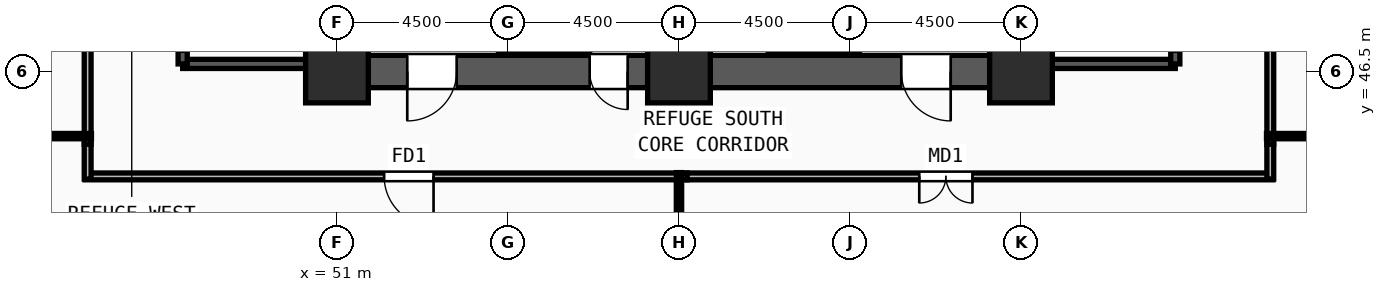
"""IFC4 building model, lengths in metres.
Left out: names, types, materials, properties, quantities, classifications, styles, units other than length and angle.
Written with IfcOpenShell. Run it as: python <this file> out.ifc"""

import sys

from ifc_helpers import new_model, si_unit, direction, frame, frame_2d, origin, origin_2d, place, context, subcontext, project, spatial, rectangle, extrude, source, transform, mapped, element, fill, save


model = new_model("IFC4")
c1 = context("Model", 3, precision=1e-05, world=origin(), true_north=direction((0.0, 1.0)))
c2 = subcontext(c1, "Body", "Model", "MODEL_VIEW")
j1 = project(units=[si_unit("LENGTHUNIT", "METRE"), si_unit("PLANEANGLEUNIT", "RADIAN")], contexts=[c1])
p1 = place(None, origin())
s1 = spatial("IfcSite", under=j1, at=p1, CompositionType="ELEMENT")
p2 = place(p1, origin())
s2 = spatial("IfcBuilding", under=s1, at=p2, CompositionType="ELEMENT")
p3 = place(p2, frame((0.0, 0.0, 93.0)))
s3 = spatial("IfcBuildingStorey", under=s2, at=p3, CompositionType="ELEMENT", Elevation=93.0)
m1 = source(origin(), c2, "Body", "SweptSolid", [
    extrude(rectangle(XDim=1.65, YDim=1.65, at=origin_2d()), origin(), (0.0, 0.0, 1.0), 4.5),
])
for number, where, z_axis, x_axis in (
    (1, (51.0, 46.5, 0.0), (0.0, 0.0, 1.0), (1.0, 0.0, 0.0)),
    (2, (60.0, 46.5, 0.0), (0.0, 0.0, 1.0), (1.0, 0.0, 0.0)),
    (3, (69.0, 46.5, 0.0), (0.0, 0.0, 1.0), (1.0, 0.0, 0.0)),
):
    element("IfcColumn", number, at=place(p3, frame(where, z_axis=z_axis, x_axis=x_axis)), inside=s3, PredefinedType="COLUMN", context=c2, shape_type="MappedRepresentation", body=[
        mapped(m1, transform((0.0, 0.0, 0.0), x_axis=(1.0, 0.0, 0.0), y_axis=(0.0, 1.0, 0.0), z_axis=(0.0, 0.0, 1.0), scale=1.0)),
    ])
p4 = place(p3, frame((68.175, 46.5, 0.0), z_axis=(0.0, 0.0, 1.0), x_axis=(-1.0, 0.0, 0.0)))
e4 = element("IfcWall", 4, at=p4, inside=s3, PredefinedType="SHEAR", context=c2, shape_type="SweptSolid", body=[
    extrude(rectangle(XDim=7.35, YDim=0.85, at=frame_2d((3.675, 0.0))), origin(), (0.0, 0.0, 1.0), 4.22),
])
m2 = source(origin(), c2, "Body", "SweptSolid", [
    extrude(rectangle(XDim=1.3, YDim=2.2, at=frame_2d((0.65, 1.1))), frame((0.0, 0.435, 0.0), z_axis=(0.0, -1.0, 0.0), x_axis=(1.0, 0.0, 0.0)), (0.0, 0.0, 1.0), 0.87),
])
p5 = place(p4, frame((1.025, 0.0, 0.0)))
e5 = element("IfcOpeningElement", 5, at=p5, cuts=e4, PredefinedType="OPENING", context=c2, shape_type="MappedRepresentation", body=[
    mapped(m2, transform((0.0, 0.0, 0.0), x_axis=(1.0, 0.0, 0.0), y_axis=(0.0, 1.0, 0.0), z_axis=(0.0, 0.0, 1.0), scale=1.0)),
])
p6 = place(p3, frame((59.175, 46.5, 0.0), z_axis=(0.0, 0.0, 1.0), x_axis=(-1.0, 0.0, 0.0)))
e6 = element("IfcWall", 6, at=p6, inside=s3, PredefinedType="SHEAR", context=c2, shape_type="SweptSolid", body=[
    extrude(rectangle(XDim=7.35, YDim=0.85, at=frame_2d((3.675, 0.0))), origin(), (0.0, 0.0, 1.0), 4.22),
])
p7 = place(p6, frame((5.025, 0.0, 0.0)))
e7 = element("IfcOpeningElement", 7, at=p7, cuts=e6, PredefinedType="OPENING", context=c2, shape_type="MappedRepresentation", body=[
    mapped(m2, transform((0.0, 0.0, 0.0), x_axis=(1.0, 0.0, 0.0), y_axis=(0.0, 1.0, 0.0), z_axis=(0.0, 0.0, 1.0), scale=1.0)),
])
m3 = source(origin(), c2, "Body", "SweptSolid", [
    extrude(rectangle(XDim=1.0, YDim=2.2, at=frame_2d((0.5, 1.1))), frame((0.0, 0.435, 0.0), z_axis=(0.0, -1.0, 0.0), x_axis=(1.0, 0.0, 0.0)), (0.0, 0.0, 1.0), 0.87),
])
p8 = place(p6, frame((0.525, 0.0, 0.0)))
e8 = element("IfcOpeningElement", 8, at=p8, cuts=e6, PredefinedType="OPENING", context=c2, shape_type="MappedRepresentation", body=[
    mapped(m3, transform((0.0, 0.0, 0.0), x_axis=(1.0, 0.0, 0.0), y_axis=(0.0, 1.0, 0.0), z_axis=(0.0, 0.0, 1.0), scale=1.0)),
])
p9 = place(p3, frame((46.94, 46.7, 0.0), z_axis=(0.0, 0.0, 1.0), x_axis=(1.0, 0.0, 0.0)))
e9 = element("IfcWall", 9, at=p9, inside=s3, PredefinedType="SOLIDWALL", context=c2, shape_type="SweptSolid", body=[
    extrude(rectangle(XDim=3.44, YDim=0.24, at=frame_2d((1.72, 0.0))), origin(), (0.0, 0.0, 1.0), 4.22),
])
p10 = place(p3, frame((50.38, 46.7, 0.0), z_axis=(0.0, 0.0, 1.0), x_axis=(0.0, 1.0, 0.0)))
e10 = element("IfcWall", 10, at=p10, inside=s3, PredefinedType="SOLIDWALL", context=c2, shape_type="SweptSolid", body=[
    extrude(rectangle(XDim=7.82, YDim=0.24, at=frame_2d((3.91, 0.0))), origin(), (0.0, 0.0, 1.0), 4.22),
])
p11 = place(p3, frame((46.94, 54.52, 0.0), z_axis=(0.0, 0.0, 1.0), x_axis=(0.0, -1.0, 0.0)))
e11 = element("IfcWall", 11, at=p11, inside=s3, PredefinedType="SOLIDWALL", context=c2, shape_type="SweptSolid", body=[
    extrude(rectangle(XDim=7.82, YDim=0.24, at=frame_2d((3.91, 0.0))), origin(), (0.0, 0.0, 1.0), 4.22),
])
m4 = source(origin(), c2, "Body", "SweptSolid", [
    extrude(rectangle(XDim=1.2, YDim=2.2, at=frame_2d((0.6, 1.1))), frame((0.0, 0.13, 0.0), z_axis=(0.0, -1.0, 0.0), x_axis=(1.0, 0.0, 0.0)), (0.0, 0.0, 1.0), 0.26),
])
p12 = place(p11, frame((6.3, 0.0, 0.0)))
e12 = element("IfcOpeningElement", 12, at=p12, cuts=e11, PredefinedType="OPENING", context=c2, shape_type="MappedRepresentation", body=[
    mapped(m4, transform((0.0, 0.0, 0.0), x_axis=(1.0, 0.0, 0.0), y_axis=(0.0, 1.0, 0.0), z_axis=(0.0, 0.0, 1.0), scale=1.0)),
])
p13 = place(p3, frame((69.62, 46.7, 0.0), z_axis=(0.0, 0.0, 1.0), x_axis=(1.0, 0.0, 0.0)))
e13 = element("IfcWall", 13, at=p13, inside=s3, PredefinedType="SOLIDWALL", context=c2, shape_type="SweptSolid", body=[
    extrude(rectangle(XDim=3.44, YDim=0.24, at=frame_2d((1.72, 0.0))), origin(), (0.0, 0.0, 1.0), 4.22),
])
p14 = place(p3, frame((73.06, 46.7, 0.0), z_axis=(0.0, 0.0, 1.0), x_axis=(0.0, 1.0, 0.0)))
e14 = element("IfcWall", 14, at=p14, inside=s3, PredefinedType="SOLIDWALL", context=c2, shape_type="SweptSolid", body=[
    extrude(rectangle(XDim=7.82, YDim=0.24, at=frame_2d((3.91, 0.0))), origin(), (0.0, 0.0, 1.0), 4.22),
])
p15 = place(p14, frame((0.32, 0.0, 0.0)))
e15 = element("IfcOpeningElement", 15, at=p15, cuts=e14, PredefinedType="OPENING", context=c2, shape_type="MappedRepresentation", body=[
    mapped(m4, transform((0.0, 0.0, 0.0), x_axis=(1.0, 0.0, 0.0), y_axis=(0.0, 1.0, 0.0), z_axis=(0.0, 0.0, 1.0), scale=1.0)),
])
p16 = place(p3, frame((69.62, 54.52, 0.0), z_axis=(0.0, 0.0, 1.0), x_axis=(0.0, -1.0, 0.0)))
e16 = element("IfcWall", 16, at=p16, inside=s3, PredefinedType="SOLIDWALL", context=c2, shape_type="SweptSolid", body=[
    extrude(rectangle(XDim=7.82, YDim=0.24, at=frame_2d((3.91, 0.0))), origin(), (0.0, 0.0, 1.0), 4.22),
])
p17 = place(p3, frame((75.56, 67.015, 0.0), z_axis=(0.0, 0.0, 1.0), x_axis=(0.0, -1.0, 0.0)))
e17 = element("IfcWall", 17, at=p17, inside=s3, PredefinedType="PARTITIONING", context=c2, shape_type="SweptSolid", body=[
    extrude(rectangle(XDim=22.43, YDim=0.18, at=frame_2d((11.215, 0.0))), origin(), (0.0, 0.0, 1.0), 4.22),
])
m5 = source(origin(), c2, "Body", "SweptSolid", [
    extrude(rectangle(XDim=1.3, YDim=2.2, at=frame_2d((0.65, 1.1))), frame((0.0, 0.1, 0.0), z_axis=(0.0, -1.0, 0.0), x_axis=(1.0, 0.0, 0.0)), (0.0, 0.0, 1.0), 0.2),
])
p18 = place(p17, frame((10.565, 0.0, 0.0)))
e18 = element("IfcOpeningElement", 18, at=p18, cuts=e17, PredefinedType="OPENING", context=c2, shape_type="MappedRepresentation", body=[
    mapped(m5, transform((0.0, 0.0, 0.0), x_axis=(1.0, 0.0, 0.0), y_axis=(0.0, 1.0, 0.0), z_axis=(0.0, 0.0, 1.0), scale=1.0)),
])
p19 = place(p3, frame((60.215, 43.74, 0.0), z_axis=(0.0, 0.0, 1.0), x_axis=(-1.0, 0.0, 0.0)))
e19 = element("IfcWall", 19, at=p19, inside=s3, PredefinedType="PARTITIONING", context=c2, shape_type="SweptSolid", body=[
    extrude(rectangle(XDim=15.845, YDim=0.18, at=frame_2d((7.922, 0.0))), origin(), (0.0, 0.0, 1.0), 4.22),
])
p20 = place(p19, frame((6.673, 0.0, 0.0)))
e20 = element("IfcOpeningElement", 20, at=p20, cuts=e19, PredefinedType="OPENING", context=c2, shape_type="MappedRepresentation", body=[
    mapped(m5, transform((0.0, 0.0, 0.0), x_axis=(1.0, 0.0, 0.0), y_axis=(0.0, 1.0, 0.0), z_axis=(0.0, 0.0, 1.0), scale=1.0)),
])
p21 = place(p3, frame((75.63, 43.74, 0.0), z_axis=(0.0, 0.0, 1.0), x_axis=(-1.0, 0.0, 0.0)))
e21 = element("IfcWall", 21, at=p21, inside=s3, PredefinedType="PARTITIONING", context=c2, shape_type="SweptSolid", body=[
    extrude(rectangle(XDim=15.415, YDim=0.18, at=frame_2d((7.708, 0.0))), origin(), (0.0, 0.0, 1.0), 4.22),
])
m6 = source(origin(), c2, "Body", "SweptSolid", [
    extrude(rectangle(XDim=1.4, YDim=2.25, at=frame_2d((0.7, 1.125))), frame((0.0, 0.1, 0.0), z_axis=(0.0, -1.0, 0.0), x_axis=(1.0, 0.0, 0.0)), (0.0, 0.0, 1.0), 0.2),
])
p22 = place(p21, frame((7.907, 0.0, 0.0)))
e22 = element("IfcOpeningElement", 22, at=p22, cuts=e21, PredefinedType="OPENING", context=c2, shape_type="MappedRepresentation", body=[
    mapped(m6, transform((0.0, 0.0, 0.0), x_axis=(1.0, 0.0, 0.0), y_axis=(0.0, 1.0, 0.0), z_axis=(0.0, 0.0, 1.0), scale=1.0)),
])
p23 = place(p3, frame((44.44, 44.585, 0.0), z_axis=(0.0, 0.0, 1.0), x_axis=(0.0, 1.0, 0.0)))
e23 = element("IfcWall", 23, at=p23, inside=s3, PredefinedType="PARTITIONING", context=c2, shape_type="SweptSolid", body=[
    extrude(rectangle(XDim=2.755, YDim=0.18, at=frame_2d((1.377, 0.0))), origin(), (0.0, 0.0, 1.0), 4.22),
])
for number, where, z_axis, x_axis in (
    (24, (44.44, 43.67, 0.0), (0.0, 0.0, 1.0), (0.0, 1.0, 0.0)),
    (25, (75.56, 44.585, 0.0), (0.0, 0.0, 1.0), (0.0, -1.0, 0.0)),
):
    element("IfcWall", number, at=place(p3, frame(where, z_axis=z_axis, x_axis=x_axis)), inside=s3, PredefinedType="PARTITIONING", context=c2, shape_type="SweptSolid", body=[
        extrude(rectangle(XDim=0.915, YDim=0.18, at=frame_2d((0.458, 0.0))), origin(), (0.0, 0.0, 1.0), 4.22),
    ])
p24 = place(p3, frame((44.54, 44.8, 0.0), z_axis=(0.0, 0.0, 1.0), x_axis=(-1.0, 0.0, 0.0)))
e26 = element("IfcWall", 26, at=p24, inside=s3, PredefinedType="PARTITIONING", context=c2, shape_type="SweptSolid", body=[
    extrude(rectangle(XDim=10.8, YDim=0.14, at=frame_2d((5.4, 0.0))), origin(), (0.0, 0.0, 1.0), 4.22),
])
p25 = place(p3, frame((75.46, 44.8, 0.0), z_axis=(0.0, 0.0, 1.0), x_axis=(1.0, 0.0, 0.0)))
e27 = element("IfcWall", 27, at=p25, inside=s3, PredefinedType="PARTITIONING", context=c2, shape_type="SweptSolid", body=[
    extrude(rectangle(XDim=11.136, YDim=0.14, at=frame_2d((5.568, 0.0))), origin(), (0.0, 0.0, 1.0), 3.355),
])
p26 = place(p3, frame((60.0, 43.84, 0.0), z_axis=(0.0, 0.0, 1.0), x_axis=(0.0, -1.0, 0.0)))
e28 = element("IfcWall", 28, at=p26, inside=s3, PredefinedType="PARTITIONING", context=c2, shape_type="SweptSolid", body=[
    extrude(rectangle(XDim=28.773, YDim=0.14, at=frame_2d((14.387, 0.0))), origin(), (0.0, 0.0, 1.0), 4.22),
])
m7 = source(origin(), c2, "Body", "SweptSolid", [
    extrude(rectangle(XDim=1.3, YDim=2.2, at=frame_2d((0.65, 1.1))), frame((0.0, 0.025, 0.0), z_axis=(0.0, -1.0, 0.0), x_axis=(1.0, 0.0, 0.0)), (0.0, 0.0, 1.0), 0.05),
])
p27 = place(p7, origin())
e29 = element("IfcDoor", 29, at=p27, inside=s3, OperationType="SINGLE_SWING_RIGHT", PredefinedType="DOOR", context=c2, shape_type="MappedRepresentation", body=[
    mapped(m7, transform((0.0, 0.0, 0.0), x_axis=(1.0, 0.0, 0.0), y_axis=(0.0, 1.0, 0.0), z_axis=(0.0, 0.0, 1.0), scale=1.0)),
])
fill(e7, e29)
m8 = source(origin(), c2, "Body", "SweptSolid", [
    extrude(rectangle(XDim=1.0, YDim=2.2, at=frame_2d((0.5, 1.1))), frame((0.0, 0.025, 0.0), z_axis=(0.0, -1.0, 0.0), x_axis=(1.0, 0.0, 0.0)), (0.0, 0.0, 1.0), 0.05),
])
p28 = place(p8, origin())
e30 = element("IfcDoor", 30, at=p28, inside=s3, OperationType="SINGLE_SWING_LEFT", PredefinedType="DOOR", context=c2, shape_type="MappedRepresentation", body=[
    mapped(m8, transform((0.0, 0.0, 0.0), x_axis=(1.0, 0.0, 0.0), y_axis=(0.0, 1.0, 0.0), z_axis=(0.0, 0.0, 1.0), scale=1.0)),
])
fill(e8, e30)
p29 = place(p5, origin())
e31 = element("IfcDoor", 31, at=p29, inside=s3, OperationType="SINGLE_SWING_LEFT", PredefinedType="DOOR", context=c2, shape_type="MappedRepresentation", body=[
    mapped(m7, transform((0.0, 0.0, 0.0), x_axis=(1.0, 0.0, 0.0), y_axis=(0.0, 1.0, 0.0), z_axis=(0.0, 0.0, 1.0), scale=1.0)),
])
fill(e5, e31)
p30 = place(p20, origin())
e32 = element("IfcDoor", 32, at=p30, inside=s3, OperationType="SINGLE_SWING_LEFT", PredefinedType="DOOR", context=c2, shape_type="MappedRepresentation", body=[
    mapped(m7, transform((0.0, 0.0, 0.0), x_axis=(1.0, 0.0, 0.0), y_axis=(0.0, 1.0, 0.0), z_axis=(0.0, 0.0, 1.0), scale=1.0)),
])
fill(e20, e32)
m9 = source(origin(), c2, "Body", "SweptSolid", [
    extrude(rectangle(XDim=1.4, YDim=2.25, at=frame_2d((0.7, 1.125))), frame((0.0, 0.025, 0.0), z_axis=(0.0, -1.0, 0.0), x_axis=(1.0, 0.0, 0.0)), (0.0, 0.0, 1.0), 0.05),
])
p31 = place(p22, origin())
e33 = element("IfcDoor", 33, at=p31, inside=s3, OperationType="DOUBLE_DOOR_SINGLE_SWING", PredefinedType="DOOR", context=c2, shape_type="MappedRepresentation", body=[
    mapped(m9, transform((0.0, 0.0, 0.0), x_axis=(1.0, 0.0, 0.0), y_axis=(0.0, 1.0, 0.0), z_axis=(0.0, 0.0, 1.0), scale=1.0)),
])
fill(e22, e33)
save(model, sys.argv[1])
